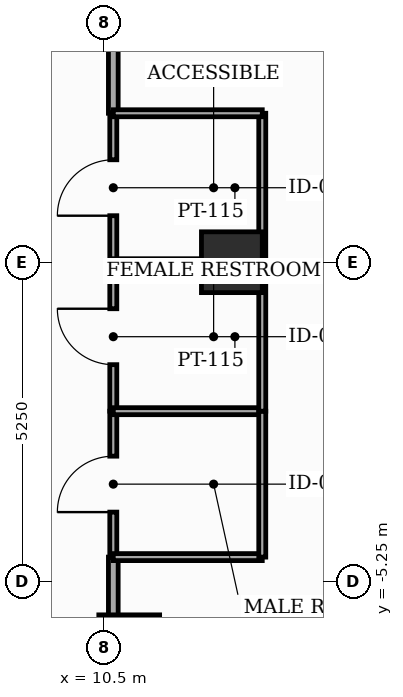
"""IFC4 building model, lengths in metres.
Left out: names, types, materials, properties, quantities, classifications, styles, units other than length and angle.
Written with IfcOpenShell. Run it as: python <this file> out.ifc"""

import sys

from ifc_helpers import new_model, si_unit, direction, frame, frame_2d, origin, origin_2d, place, context, subcontext, project, spatial, rectangle, extrude, element, fill, save


model = new_model("IFC4")
c1 = context("Model", 3, precision=1e-05, world=origin(), true_north=direction((0.0, 1.0)))
c2 = subcontext(c1, "Body", "Model", "MODEL_VIEW")
j1 = project(units=[si_unit("LENGTHUNIT", "METRE"), si_unit("PLANEANGLEUNIT", "RADIAN")], contexts=[c1])
p1 = place(None, origin())
s1 = spatial("IfcSite", under=j1, at=p1, CompositionType="ELEMENT")
p2 = place(p1, origin())
s2 = spatial("IfcBuilding", under=s1, at=p2, CompositionType="ELEMENT")
p3 = place(p2, frame((0.0, 0.0, 241.1)))
s3 = spatial("IfcBuildingStorey", under=s2, at=p3, CompositionType="ELEMENT", Elevation=241.1)
for number, where, z_axis, x_axis in (
    (1, (12.6, 0.0, 0.0), (0.0, 0.0, 1.0), (1.0, 0.0, 0.0)),
    (2, (10.912, -6.3, 0.0), (0.0, 0.0, 1.0), (1.0, 0.0, 0.0)),
):
    element("IfcColumn", number, at=place(p3, frame(where, z_axis=z_axis, x_axis=x_axis)), inside=s3, PredefinedType="COLUMN", context=c2, shape_type="SweptSolid", body=[
        extrude(rectangle(XDim=1.0, YDim=1.0, at=origin_2d()), origin(), (0.0, 0.0, 1.0), 3.7),
    ])
p4 = place(p3, frame((10.65, -4.85, 0.0), z_axis=(0.0, 0.0, 1.0), x_axis=(0.0, 1.0, 0.0)))
e3 = element("IfcWall", 3, at=p4, inside=s3, PredefinedType="PARTITIONING", context=c2, shape_type="SweptSolid", body=[
    extrude(rectangle(XDim=2.4, YDim=0.115, at=frame_2d((1.2, 0.0))), origin(), (0.0, 0.0, 1.0), 3.5),
])
p5 = place(p4, frame((0.74, 0.0, 0.0)))
e4 = element("IfcOpeningElement", 4, at=p5, cuts=e3, PredefinedType="OPENING", context=c2, shape_type="SweptSolid", body=[
    extrude(rectangle(XDim=0.92, YDim=2.1, at=frame_2d((0.46, 1.05))), frame((0.0, 0.067, 0.0), z_axis=(0.0, -1.0, 0.0), x_axis=(1.0, 0.0, 0.0)), (0.0, 0.0, 1.0), 0.135),
])
p6 = place(p3, frame((10.65, -2.45, 0.0), z_axis=(0.0, 0.0, 1.0), x_axis=(0.0, 1.0, 0.0)))
e5 = element("IfcWall", 5, at=p6, inside=s3, PredefinedType="PARTITIONING", context=c2, shape_type="SweptSolid", body=[
    extrude(rectangle(XDim=2.45, YDim=0.115, at=frame_2d((1.225, 0.0))), origin(), (0.0, 0.0, 1.0), 2.885),
])
p7 = place(p6, frame((0.765, 0.0, 0.0)))
e6 = element("IfcOpeningElement", 6, at=p7, cuts=e5, PredefinedType="OPENING", context=c2, shape_type="SweptSolid", body=[
    extrude(rectangle(XDim=0.92, YDim=2.1, at=frame_2d((0.46, 1.05))), frame((0.0, 0.067, 0.0), z_axis=(0.0, -1.0, 0.0), x_axis=(1.0, 0.0, 0.0)), (0.0, 0.0, 1.0), 0.135),
])
p8 = place(p3, frame((10.65, 0.0, 0.0), z_axis=(0.0, 0.0, 1.0), x_axis=(0.0, 1.0, 0.0)))
e7 = element("IfcWall", 7, at=p8, inside=s3, PredefinedType="PARTITIONING", context=c2, shape_type="SweptSolid", body=[
    extrude(rectangle(XDim=2.45, YDim=0.115, at=frame_2d((1.225, 0.0))), origin(), (0.0, 0.0, 1.0), 2.885),
])
p9 = place(p8, frame((0.765, 0.0, 0.0)))
e8 = element("IfcOpeningElement", 8, at=p9, cuts=e7, PredefinedType="OPENING", context=c2, shape_type="SweptSolid", body=[
    extrude(rectangle(XDim=0.92, YDim=2.1, at=frame_2d((0.46, 1.05))), frame((0.0, 0.067, 0.0), z_axis=(0.0, -1.0, 0.0), x_axis=(1.0, 0.0, 0.0)), (0.0, 0.0, 1.0), 0.135),
])
p10 = place(p3, frame((10.65, -10.15, 0.0), z_axis=(0.0, 0.0, 1.0), x_axis=(0.0, 1.0, 0.0)))
e9 = element("IfcWall", 9, at=p10, inside=s3, PredefinedType="PARTITIONING", context=c2, shape_type="SweptSolid", body=[
    extrude(rectangle(XDim=5.3, YDim=0.16, at=frame_2d((2.65, 0.0))), origin(), (0.0, 0.0, 1.0), 2.885),
])
p11 = place(p10, frame((0.56, 0.0, 0.0)))
e10 = element("IfcOpeningElement", 10, at=p11, cuts=e9, PredefinedType="OPENING", context=c2, shape_type="SweptSolid", body=[
    extrude(rectangle(XDim=1.0, YDim=2.15, at=frame_2d((0.5, 1.075))), frame((0.0, 0.09, 0.0), z_axis=(0.0, -1.0, 0.0), x_axis=(1.0, 0.0, 0.0)), (0.0, 0.0, 1.0), 0.18),
])
p12 = place(p3, frame((10.65, 2.45, 0.0), z_axis=(0.0, 0.0, 1.0), x_axis=(0.0, 1.0, 0.0)))
e11 = element("IfcWall", 11, at=p12, inside=s3, PredefinedType="PARTITIONING", context=c2, shape_type="SweptSolid", body=[
    extrude(rectangle(XDim=3.699, YDim=0.16, at=frame_2d((1.85, 0.0))), origin(), (0.0, 0.0, 1.0), 3.5),
])
for number, where, z_axis, x_axis in (
    (12, (13.1, -2.45, 0.0), (0.0, 0.0, 1.0), (-1.0, 0.0, 0.0)),
    (13, (10.65, -4.85, 0.0), (0.0, 0.0, 1.0), (1.0, 0.0, 0.0)),
):
    element("IfcWall", number, at=place(p3, frame(where, z_axis=z_axis, x_axis=x_axis)), inside=s3, PredefinedType="PARTITIONING", context=c2, shape_type="SweptSolid", body=[
        extrude(rectangle(XDim=2.45, YDim=0.115, at=frame_2d((1.225, 0.0))), origin(), (0.0, 0.0, 1.0), 2.885),
    ])
p13 = place(p3, frame((13.1, -4.85, 0.0), z_axis=(0.0, 0.0, 1.0), x_axis=(0.0, 1.0, 0.0)))
e14 = element("IfcWall", 14, at=p13, inside=s3, PredefinedType="PARTITIONING", context=c2, shape_type="SweptSolid", body=[
    extrude(rectangle(XDim=2.4, YDim=0.115, at=frame_2d((1.2, 0.0))), origin(), (0.0, 0.0, 1.0), 3.5),
])
p14 = place(p3, frame((13.1, 0.0, 0.0), z_axis=(0.0, 0.0, 1.0), x_axis=(-1.0, 0.0, 0.0)))
e15 = element("IfcWall", 15, at=p14, inside=s3, PredefinedType="PARTITIONING", context=c2, shape_type="SweptSolid", body=[
    extrude(rectangle(XDim=2.45, YDim=0.115, at=frame_2d((1.225, 0.0))), origin(), (0.0, 0.0, 1.0), 2.885),
])
for number, where, z_axis, x_axis in (
    (16, (13.1, -2.45, 0.0), (0.0, 0.0, 1.0), (0.0, 1.0, 0.0)),
    (17, (13.1, 0.0, 0.0), (0.0, 0.0, 1.0), (0.0, 1.0, 0.0)),
):
    element("IfcWall", number, at=place(p3, frame(where, z_axis=z_axis, x_axis=x_axis)), inside=s3, PredefinedType="PARTITIONING", context=c2, shape_type="SweptSolid", body=[
        extrude(rectangle(XDim=2.45, YDim=0.115, at=frame_2d((1.225, 0.0))), origin(), (0.0, 0.0, 1.0), 2.985),
    ])
p15 = place(p3, frame((13.1, 2.45, 0.0), z_axis=(0.0, 0.0, 1.0), x_axis=(-1.0, 0.0, 0.0)))
e18 = element("IfcWall", 18, at=p15, inside=s3, PredefinedType="PARTITIONING", context=c2, shape_type="SweptSolid", body=[
    extrude(rectangle(XDim=2.45, YDim=0.115, at=frame_2d((1.225, 0.0))), origin(), (0.0, 0.0, 1.0), 2.885),
])
p16 = place(p5, origin())
e19 = element("IfcDoor", 19, at=p16, inside=s3, OperationType="SINGLE_SWING_LEFT", PredefinedType="DOOR", context=c2, shape_type="SweptSolid", body=[
    extrude(rectangle(XDim=0.92, YDim=2.1, at=frame_2d((0.46, 1.05))), frame((0.0, 0.025, 0.0), z_axis=(0.0, -1.0, 0.0), x_axis=(1.0, 0.0, 0.0)), (0.0, 0.0, 1.0), 0.05),
])
fill(e4, e19)
p17 = place(p7, origin())
e20 = element("IfcDoor", 20, at=p17, inside=s3, OperationType="SINGLE_SWING_RIGHT", PredefinedType="DOOR", context=c2, shape_type="SweptSolid", body=[
    extrude(rectangle(XDim=0.92, YDim=2.1, at=frame_2d((0.46, 1.05))), frame((0.0, 0.025, 0.0), z_axis=(0.0, -1.0, 0.0), x_axis=(1.0, 0.0, 0.0)), (0.0, 0.0, 1.0), 0.05),
])
fill(e6, e20)
p18 = place(p9, origin())
e21 = element("IfcDoor", 21, at=p18, inside=s3, OperationType="SINGLE_SWING_LEFT", PredefinedType="DOOR", context=c2, shape_type="SweptSolid", body=[
    extrude(rectangle(XDim=0.92, YDim=2.1, at=frame_2d((0.46, 1.05))), frame((0.0, 0.025, 0.0), z_axis=(0.0, -1.0, 0.0), x_axis=(1.0, 0.0, 0.0)), (0.0, 0.0, 1.0), 0.05),
])
fill(e8, e21)
save(model, sys.argv[1])
